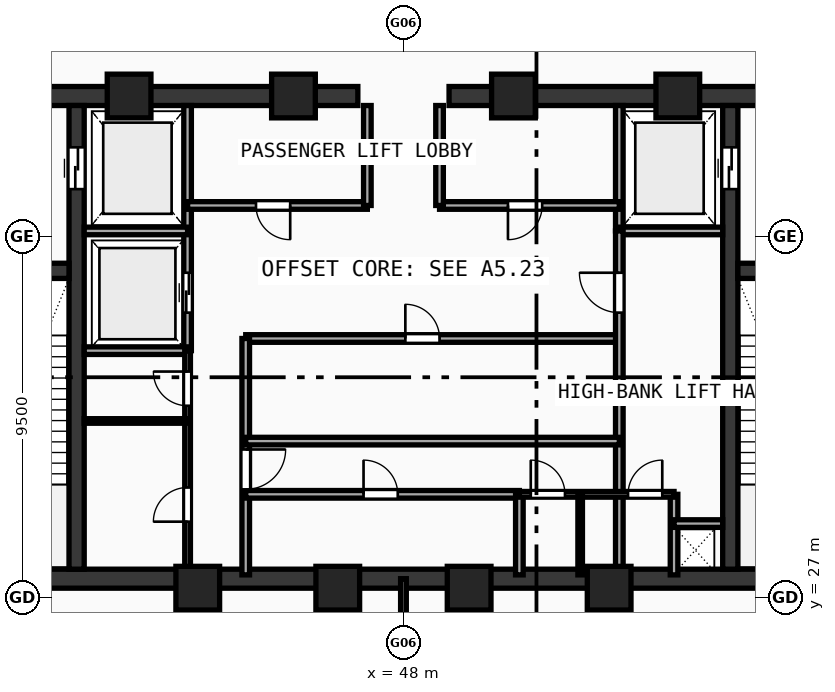
"""IFC4 building model, lengths in metres.
Left out: names, types, materials, properties, quantities, classifications, styles, units other than length and angle.
Written with IfcOpenShell. Run it as: python <this file> out.ifc"""

import sys

from ifc_helpers import new_model, si_unit, direction, frame, frame_2d, origin, origin_with_axes, origin_2d, place, context, subcontext, project, spatial, rectangle, hollow_rectangle, extrude, source, transform, mapped, element, fill, save


model = new_model("IFC4")
c1 = context("Model", 3, precision=1e-05, world=origin(), true_north=direction((0.0, 1.0)))
c2 = subcontext(c1, "Body", "Model", "MODEL_VIEW")
j1 = project(units=[si_unit("LENGTHUNIT", "METRE"), si_unit("PLANEANGLEUNIT", "RADIAN")], contexts=[c1])
p1 = place(None, origin())
s1 = spatial("IfcSite", under=j1, at=p1, CompositionType="ELEMENT")
p2 = place(p1, origin())
s2 = spatial("IfcBuilding", under=s1, at=p2, CompositionType="ELEMENT")
p3 = place(p2, frame((0.0, 0.0, 376.76)))
s3 = spatial("IfcBuildingStorey", under=s2, at=p3, CompositionType="ELEMENT", Elevation=376.76)
p4 = place(p3, frame((35.55, 27.5, 0.0), z_axis=(0.0, 0.0, 1.0), x_axis=(1.0, 0.0, 0.0)))
e1 = element("IfcWall", 1, at=p4, inside=s3, PredefinedType="SHEAR", context=c2, shape_type="SweptSolid", body=[
    extrude(rectangle(XDim=24.9, YDim=0.5, at=frame_2d((12.45, 0.0))), origin(), (0.0, 0.0, 1.0), 4.72),
])
p5 = place(p3, frame((35.55, 40.2, 0.0), z_axis=(0.0, 0.0, 1.0), x_axis=(1.0, 0.0, 0.0)))
e2 = element("IfcWall", 2, at=p5, inside=s3, PredefinedType="SHEAR", context=c2, shape_type="SweptSolid", body=[
    extrude(rectangle(XDim=11.25, YDim=0.5, at=frame_2d((5.625, 0.0))), origin(), (0.0, 0.0, 1.0), 4.72),
])
p6 = place(p5, frame((1.6, 0.0, 0.0)))
e3 = element("IfcOpeningElement", 3, at=p6, cuts=e2, PredefinedType="OPENING", context=c2, shape_type="SweptSolid", body=[
    extrude(rectangle(XDim=1.05, YDim=2.1, at=frame_2d((0.525, 1.05))), frame((0.0, 0.26, 0.0), z_axis=(0.0, -1.0, 0.0), x_axis=(1.0, 0.0, 0.0)), (0.0, 0.0, 1.0), 0.52),
])
p7 = place(p3, frame((49.2, 40.2, 0.0), z_axis=(0.0, 0.0, 1.0), x_axis=(1.0, 0.0, 0.0)))
e4 = element("IfcWall", 4, at=p7, inside=s3, PredefinedType="SHEAR", context=c2, shape_type="SweptSolid", body=[
    extrude(rectangle(XDim=11.25, YDim=0.5, at=frame_2d((5.625, 0.0))), origin(), (0.0, 0.0, 1.0), 4.72),
])
p8 = place(p7, frame((8.6, 0.0, 0.0)))
e5 = element("IfcOpeningElement", 5, at=p8, cuts=e4, PredefinedType="OPENING", context=c2, shape_type="SweptSolid", body=[
    extrude(rectangle(XDim=1.05, YDim=2.1, at=frame_2d((0.525, 1.05))), frame((0.0, 0.26, 0.0), z_axis=(0.0, -1.0, 0.0), x_axis=(1.0, 0.0, 0.0)), (0.0, 0.0, 1.0), 0.52),
])
p9 = place(p3, frame((39.4, 27.75, 0.0), z_axis=(0.0, 0.0, 1.0), x_axis=(0.0, 1.0, 0.0)))
e6 = element("IfcWall", 6, at=p9, inside=s3, PredefinedType="SHEAR", context=c2, shape_type="SweptSolid", body=[
    extrude(rectangle(XDim=12.2, YDim=0.4, at=frame_2d((6.1, 0.0))), origin(), (0.0, 0.0, 1.0), 4.72),
])
p10 = place(p9, frame((10.0, 0.0, 0.0)))
e7 = element("IfcOpeningElement", 7, at=p10, cuts=e6, PredefinedType="OPENING", context=c2, shape_type="SweptSolid", body=[
    extrude(rectangle(XDim=1.1, YDim=2.1, at=frame_2d((0.55, 1.05))), frame((0.0, 0.21, 0.0), z_axis=(0.0, -1.0, 0.0), x_axis=(1.0, 0.0, 0.0)), (0.0, 0.0, 1.0), 0.42),
])
p11 = place(p3, frame((56.6, 27.75, 0.0), z_axis=(0.0, 0.0, 1.0), x_axis=(0.0, 1.0, 0.0)))
e8 = element("IfcWall", 8, at=p11, inside=s3, PredefinedType="SHEAR", context=c2, shape_type="SweptSolid", body=[
    extrude(rectangle(XDim=12.2, YDim=0.4, at=frame_2d((6.1, 0.0))), origin(), (0.0, 0.0, 1.0), 4.72),
])
p12 = place(p11, frame((10.0, 0.0, 0.0)))
e9 = element("IfcOpeningElement", 9, at=p12, cuts=e8, PredefinedType="OPENING", context=c2, shape_type="SweptSolid", body=[
    extrude(rectangle(XDim=1.1, YDim=2.1, at=frame_2d((0.55, 1.05))), frame((0.0, 0.21, 0.0), z_axis=(0.0, -1.0, 0.0), x_axis=(1.0, 0.0, 0.0)), (0.0, 0.0, 1.0), 0.42),
])
p13 = place(p3, frame((36.05, 35.6, 0.0), z_axis=(0.0, 0.0, 1.0), x_axis=(1.0, 0.0, 0.0)))
e10 = element("IfcWall", 10, at=p13, inside=s3, PredefinedType="SHEAR", context=c2, shape_type="SweptSolid", body=[
    extrude(rectangle(XDim=3.15, YDim=0.4, at=frame_2d((1.575, 0.0))), origin(), (0.0, 0.0, 1.0), 4.72),
])
p14 = place(p13, frame((1.07, 0.0, 0.0)))
e11 = element("IfcOpeningElement", 11, at=p14, cuts=e10, PredefinedType="OPENING", context=c2, shape_type="SweptSolid", body=[
    extrude(rectangle(XDim=1.05, YDim=2.1, at=frame_2d((0.525, 1.05))), frame((0.0, 0.21, 0.0), z_axis=(0.0, -1.0, 0.0), x_axis=(1.0, 0.0, 0.0)), (0.0, 0.0, 1.0), 0.42),
])
p15 = place(p3, frame((56.8, 35.6, 0.0), z_axis=(0.0, 0.0, 1.0), x_axis=(1.0, 0.0, 0.0)))
e12 = element("IfcWall", 12, at=p15, inside=s3, PredefinedType="SHEAR", context=c2, shape_type="SweptSolid", body=[
    extrude(rectangle(XDim=3.15, YDim=0.4, at=frame_2d((1.575, 0.0))), origin(), (0.0, 0.0, 1.0), 4.72),
])
p16 = place(p15, frame((1.02, 0.0, 0.0)))
e13 = element("IfcOpeningElement", 13, at=p16, cuts=e12, PredefinedType="OPENING", context=c2, shape_type="SweptSolid", body=[
    extrude(rectangle(XDim=1.05, YDim=2.1, at=frame_2d((0.525, 1.05))), frame((0.0, 0.21, 0.0), z_axis=(0.0, -1.0, 0.0), x_axis=(1.0, 0.0, 0.0)), (0.0, 0.0, 1.0), 0.42),
])
m1 = source(origin(), c2, "Body", "SweptSolid", [
    extrude(hollow_rectangle(XDim=1.15, YDim=1.15, WallThickness=0.048, at=origin_2d()), origin(), (0.0, 0.0, 1.0), 5.0),
])
for number, where, z_axis, x_axis in (
    (14, (42.588, 27.25, -0.28), (0.0, 0.0, 1.0), (1.0, 0.0, 0.0)),
    (15, (46.272, 27.25, -0.28), (0.0, 0.0, 1.0), (1.0, 0.0, 0.0)),
    (16, (49.729, 27.25, -0.28), (0.0, 0.0, 1.0), (1.0, 0.0, 0.0)),
    (17, (53.412, 27.25, -0.28), (0.0, 0.0, 1.0), (1.0, 0.0, 0.0)),
    (18, (55.219, 40.2, -0.28), (0.0, 0.0, 1.0), (1.0, 0.0, 0.0)),
    (19, (50.894, 40.2, -0.28), (0.0, 0.0, 1.0), (1.0, 0.0, 0.0)),
    (20, (45.106, 40.2, -0.28), (0.0, 0.0, 1.0), (1.0, 0.0, 0.0)),
    (21, (40.781, 40.2, -0.28), (0.0, 0.0, 1.0), (1.0, 0.0, 0.0)),
):
    element("IfcColumn", number, at=place(p3, frame(where, z_axis=z_axis, x_axis=x_axis)), inside=s3, PredefinedType="COLUMN", context=c2, shape_type="MappedRepresentation", body=[
        mapped(m1, transform((0.0, 0.0, 0.0), scale=1.0)),
    ])
p17 = place(p3, frame((42.32, 33.5, 0.0), z_axis=(0.0, 0.0, 1.0), x_axis=(0.0, 1.0, 0.0)))
e22 = element("IfcWall", 22, at=p17, inside=s3, PredefinedType="SOLIDWALL", context=c2, shape_type="SweptSolid", body=[
    extrude(rectangle(XDim=6.45, YDim=0.2, at=frame_2d((3.225, 0.0))), origin(), (0.0, 0.0, 1.0), 4.72),
])
p18 = place(p17, frame((1.0, 0.0, 0.0)))
e23 = element("IfcOpeningElement", 23, at=p18, cuts=e22, PredefinedType="OPENING", context=c2, shape_type="SweptSolid", body=[
    extrude(rectangle(XDim=1.05, YDim=2.1, at=frame_2d((0.525, 1.05))), frame((0.0, 0.11, 0.0), z_axis=(0.0, -1.0, 0.0), x_axis=(1.0, 0.0, 0.0)), (0.0, 0.0, 1.0), 0.22),
])
for number, where, z_axis, x_axis in (
    (24, (39.6, 36.65, 0.0), (0.0, 0.0, 1.0), (1.0, 0.0, 0.0)),
    (25, (39.6, 33.5, 0.0), (0.0, 0.0, 1.0), (1.0, 0.0, 0.0)),
):
    element("IfcWall", number, at=place(p3, frame(where, z_axis=z_axis, x_axis=x_axis)), inside=s3, PredefinedType="SOLIDWALL", context=c2, shape_type="SweptSolid", body=[
        extrude(rectangle(XDim=2.72, YDim=0.2, at=frame_2d((1.36, 0.0))), origin(), (0.0, 0.0, 1.0), 4.72),
    ])
p19 = place(p3, frame((53.68, 36.65, 0.0), z_axis=(0.0, 0.0, 1.0), x_axis=(0.0, 1.0, 0.0)))
e26 = element("IfcWall", 26, at=p19, inside=s3, PredefinedType="SOLIDWALL", context=c2, shape_type="SweptSolid", body=[
    extrude(rectangle(XDim=3.3, YDim=0.2, at=frame_2d((1.65, 0.0))), origin(), (0.0, 0.0, 1.0), 4.72),
])
p20 = place(p3, frame((53.68, 36.65, 0.0), z_axis=(0.0, 0.0, 1.0), x_axis=(1.0, 0.0, 0.0)))
e27 = element("IfcWall", 27, at=p20, inside=s3, PredefinedType="SOLIDWALL", context=c2, shape_type="SweptSolid", body=[
    extrude(rectangle(XDim=2.72, YDim=0.2, at=frame_2d((1.36, 0.0))), origin(), (0.0, 0.0, 1.0), 4.72),
])
p21 = place(p3, frame((42.32, 37.32, 0.0), z_axis=(0.0, 0.0, 1.0), x_axis=(1.0, 0.0, 0.0)))
e28 = element("IfcWall", 28, at=p21, inside=s3, PredefinedType="SOLIDWALL", context=c2, shape_type="SweptSolid", body=[
    extrude(rectangle(XDim=4.73, YDim=0.2, at=frame_2d((2.365, 0.0))), origin(), (0.0, 0.0, 1.0), 4.72),
])
p22 = place(p21, frame((1.8, 0.0, 0.0)))
e29 = element("IfcOpeningElement", 29, at=p22, cuts=e28, PredefinedType="OPENING", context=c2, shape_type="SweptSolid", body=[
    extrude(rectangle(XDim=0.9, YDim=2.1, at=frame_2d((0.45, 1.05))), frame((0.0, 0.11, 0.0), z_axis=(0.0, -1.0, 0.0), x_axis=(1.0, 0.0, 0.0)), (0.0, 0.0, 1.0), 0.22),
])
p23 = place(p3, frame((48.95, 37.32, 0.0), z_axis=(0.0, 0.0, 1.0), x_axis=(1.0, 0.0, 0.0)))
e30 = element("IfcWall", 30, at=p23, inside=s3, PredefinedType="SOLIDWALL", context=c2, shape_type="SweptSolid", body=[
    extrude(rectangle(XDim=4.73, YDim=0.2, at=frame_2d((2.365, 0.0))), origin(), (0.0, 0.0, 1.0), 4.72),
])
p24 = place(p23, frame((1.8, 0.0, 0.0)))
e31 = element("IfcOpeningElement", 31, at=p24, cuts=e30, PredefinedType="OPENING", context=c2, shape_type="SweptSolid", body=[
    extrude(rectangle(XDim=0.9, YDim=2.1, at=frame_2d((0.45, 1.05))), frame((0.0, 0.11, 0.0), z_axis=(0.0, -1.0, 0.0), x_axis=(1.0, 0.0, 0.0)), (0.0, 0.0, 1.0), 0.22),
])
for number, where, z_axis, x_axis in (
    (32, (47.05, 37.32, 0.0), (0.0, 0.0, 1.0), (0.0, 1.0, 0.0)),
    (33, (48.95, 37.32, 0.0), (0.0, 0.0, 1.0), (0.0, 1.0, 0.0)),
):
    element("IfcWall", number, at=place(p3, frame(where, z_axis=z_axis, x_axis=x_axis)), inside=s3, PredefinedType="SOLIDWALL", context=c2, shape_type="SweptSolid", body=[
        extrude(rectangle(XDim=2.63, YDim=0.2, at=frame_2d((1.315, 0.0))), origin(), (0.0, 0.0, 1.0), 4.72),
    ])
p25 = place(p3, frame((43.85, 33.82, 0.0), z_axis=(0.0, 0.0, 1.0), x_axis=(1.0, 0.0, 0.0)))
e34 = element("IfcWall", 34, at=p25, inside=s3, PredefinedType="SOLIDWALL", context=c2, shape_type="SweptSolid", body=[
    extrude(rectangle(XDim=9.83, YDim=0.2, at=frame_2d((4.915, 0.0))), origin(), (0.0, 0.0, 1.0), 4.72),
])
p26 = place(p25, frame((4.2, 0.0, 0.0)))
e35 = element("IfcOpeningElement", 35, at=p26, cuts=e34, PredefinedType="OPENING", context=c2, shape_type="SweptSolid", body=[
    extrude(rectangle(XDim=0.9, YDim=2.1, at=frame_2d((0.45, 1.05))), frame((0.0, 0.11, 0.0), z_axis=(0.0, -1.0, 0.0), x_axis=(1.0, 0.0, 0.0)), (0.0, 0.0, 1.0), 0.22),
])
p27 = place(p3, frame((43.85, 27.6, 0.0), z_axis=(0.0, 0.0, 1.0), x_axis=(0.0, 1.0, 0.0)))
e36 = element("IfcWall", 36, at=p27, inside=s3, PredefinedType="SOLIDWALL", context=c2, shape_type="SweptSolid", body=[
    extrude(rectangle(XDim=6.22, YDim=0.2, at=frame_2d((3.11, 0.0))), origin(), (0.0, 0.0, 1.0), 4.72),
])
p28 = place(p27, frame((2.25, 0.0, 0.0)))
e37 = element("IfcOpeningElement", 37, at=p28, cuts=e36, PredefinedType="OPENING", context=c2, shape_type="SweptSolid", body=[
    extrude(rectangle(XDim=1.05, YDim=2.1, at=frame_2d((0.525, 1.05))), frame((0.0, 0.11, 0.0), z_axis=(0.0, -1.0, 0.0), x_axis=(1.0, 0.0, 0.0)), (0.0, 0.0, 1.0), 0.22),
])
p29 = place(p3, frame((53.68, 27.6, 0.0), z_axis=(0.0, 0.0, 1.0), x_axis=(0.0, 1.0, 0.0)))
e38 = element("IfcWall", 38, at=p29, inside=s3, PredefinedType="SOLIDWALL", context=c2, shape_type="SweptSolid", body=[
    extrude(rectangle(XDim=9.05, YDim=0.2, at=frame_2d((4.525, 0.0))), origin(), (0.0, 0.0, 1.0), 4.72),
])
p30 = place(p29, frame((6.9, 0.0, 0.0)))
e39 = element("IfcOpeningElement", 39, at=p30, cuts=e38, PredefinedType="OPENING", context=c2, shape_type="SweptSolid", body=[
    extrude(rectangle(XDim=1.05, YDim=2.1, at=frame_2d((0.525, 1.05))), frame((0.0, 0.11, 0.0), z_axis=(0.0, -1.0, 0.0), x_axis=(1.0, 0.0, 0.0)), (0.0, 0.0, 1.0), 0.22),
])
p31 = place(p3, frame((43.85, 29.72, 0.0), z_axis=(0.0, 0.0, 1.0), x_axis=(1.0, 0.0, 0.0)))
e40 = element("IfcWall", 40, at=p31, inside=s3, PredefinedType="SOLIDWALL", context=c2, shape_type="SweptSolid", body=[
    extrude(rectangle(XDim=7.2, YDim=0.2, at=frame_2d((3.6, 0.0))), origin(), (0.0, 0.0, 1.0), 4.72),
])
p32 = place(p31, frame((3.1, 0.0, 0.0)))
e41 = element("IfcOpeningElement", 41, at=p32, cuts=e40, PredefinedType="OPENING", context=c2, shape_type="SweptSolid", body=[
    extrude(rectangle(XDim=0.9, YDim=2.1, at=frame_2d((0.45, 1.05))), frame((0.0, 0.11, 0.0), z_axis=(0.0, -1.0, 0.0), x_axis=(1.0, 0.0, 0.0)), (0.0, 0.0, 1.0), 0.22),
])
p33 = place(p3, frame((51.05, 27.6, 0.0), z_axis=(0.0, 0.0, 1.0), x_axis=(0.0, 1.0, 0.0)))
e42 = element("IfcWall", 42, at=p33, inside=s3, PredefinedType="SOLIDWALL", context=c2, shape_type="SweptSolid", body=[
    extrude(rectangle(XDim=2.12, YDim=0.2, at=frame_2d((1.06, 0.0))), origin(), (0.0, 0.0, 1.0), 4.72),
])
p34 = place(p3, frame((43.85, 31.12, 0.0), z_axis=(0.0, 0.0, 1.0), x_axis=(1.0, 0.0, 0.0)))
e43 = element("IfcWall", 43, at=p34, inside=s3, PredefinedType="SOLIDWALL", context=c2, shape_type="SweptSolid", body=[
    extrude(rectangle(XDim=9.83, YDim=0.2, at=frame_2d((4.915, 0.0))), origin(), (0.0, 0.0, 1.0), 4.72),
])
p35 = place(p3, frame((55.12, 27.6, 0.0), z_axis=(0.0, 0.0, 1.0), x_axis=(0.0, 1.0, 0.0)))
e44 = element("IfcWall", 44, at=p35, inside=s3, PredefinedType="SOLIDWALL", context=c2, shape_type="SweptSolid", body=[
    extrude(rectangle(XDim=2.12, YDim=0.2, at=frame_2d((1.06, 0.0))), origin(), (0.0, 0.0, 1.0), 4.72),
])
p36 = place(p3, frame((55.12, 28.95, 0.0), z_axis=(0.0, 0.0, 1.0), x_axis=(1.0, 0.0, 0.0)))
e45 = element("IfcWall", 45, at=p36, inside=s3, PredefinedType="SOLIDWALL", context=c2, shape_type="SweptSolid", body=[
    extrude(rectangle(XDim=1.28, YDim=0.2, at=frame_2d((0.64, 0.0))), origin(), (0.0, 0.0, 1.0), 4.72),
])
p37 = place(p3, frame((42.32, 27.6, 0.0), z_axis=(0.0, 0.0, 1.0), x_axis=(0.0, 1.0, 0.0)))
e46 = element("IfcWall", 46, at=p37, inside=s3, PredefinedType="PARTITIONING", context=c2, shape_type="SweptSolid", body=[
    extrude(rectangle(XDim=5.9, YDim=0.15, at=frame_2d((2.95, 0.0))), origin(), (0.0, 0.0, 1.0), 4.72),
])
p38 = place(p37, frame((1.4, 0.0, 0.0)))
e47 = element("IfcOpeningElement", 47, at=p38, cuts=e46, PredefinedType="OPENING", context=c2, shape_type="SweptSolid", body=[
    extrude(rectangle(XDim=0.9, YDim=2.1, at=frame_2d((0.45, 1.05))), frame((0.0, 0.085, 0.0), z_axis=(0.0, -1.0, 0.0), x_axis=(1.0, 0.0, 0.0)), (0.0, 0.0, 1.0), 0.17),
])
p39 = place(p37, frame((4.45, 0.0, 0.0)))
e48 = element("IfcOpeningElement", 48, at=p39, cuts=e46, PredefinedType="OPENING", context=c2, shape_type="SweptSolid", body=[
    extrude(rectangle(XDim=0.9, YDim=2.1, at=frame_2d((0.45, 1.05))), frame((0.0, 0.085, 0.0), z_axis=(0.0, -1.0, 0.0), x_axis=(1.0, 0.0, 0.0)), (0.0, 0.0, 1.0), 0.17),
])
p40 = place(p3, frame((51.05, 29.72, 0.0), z_axis=(0.0, 0.0, 1.0), x_axis=(1.0, 0.0, 0.0)))
e49 = element("IfcWall", 49, at=p40, inside=s3, PredefinedType="PARTITIONING", context=c2, shape_type="SweptSolid", body=[
    extrude(rectangle(XDim=4.07, YDim=0.15, at=frame_2d((2.035, 0.0))), origin(), (0.0, 0.0, 1.0), 4.72),
])
p41 = place(p40, frame((0.3, 0.0, 0.0)))
e50 = element("IfcOpeningElement", 50, at=p41, cuts=e49, PredefinedType="OPENING", context=c2, shape_type="SweptSolid", body=[
    extrude(rectangle(XDim=0.9, YDim=2.1, at=frame_2d((0.45, 1.05))), frame((0.0, 0.085, 0.0), z_axis=(0.0, -1.0, 0.0), x_axis=(1.0, 0.0, 0.0)), (0.0, 0.0, 1.0), 0.17),
])
p42 = place(p40, frame((2.86, 0.0, 0.0)))
e51 = element("IfcOpeningElement", 51, at=p42, cuts=e49, PredefinedType="OPENING", context=c2, shape_type="SweptSolid", body=[
    extrude(rectangle(XDim=0.9, YDim=2.1, at=frame_2d((0.45, 1.05))), frame((0.0, 0.085, 0.0), z_axis=(0.0, -1.0, 0.0), x_axis=(1.0, 0.0, 0.0)), (0.0, 0.0, 1.0), 0.17),
])
p43 = place(p3, frame((39.6, 31.65, 0.0), z_axis=(0.0, 0.0, 1.0), x_axis=(1.0, 0.0, 0.0)))
e52 = element("IfcWall", 52, at=p43, inside=s3, PredefinedType="PARTITIONING", context=c2, shape_type="SweptSolid", body=[
    extrude(rectangle(XDim=2.72, YDim=0.12, at=frame_2d((1.36, 0.0))), origin(), (0.0, 0.0, 1.0), 4.72),
])
p44 = place(p3, frame((52.65, 27.6, 0.0), z_axis=(0.0, 0.0, 1.0), x_axis=(0.0, 1.0, 0.0)))
e53 = element("IfcWall", 53, at=p44, inside=s3, PredefinedType="PARTITIONING", context=c2, shape_type="SweptSolid", body=[
    extrude(rectangle(XDim=2.12, YDim=0.12, at=frame_2d((1.06, 0.0))), origin(), (0.0, 0.0, 1.0), 4.72),
])
p45 = place(p3, frame((48.0, 23.314, 0.0), z_axis=(0.0, 0.0, 1.0), x_axis=(0.0, 1.0, 0.0)))
e54 = element("IfcWall", 54, at=p45, inside=s3, PredefinedType="PARTITIONING", context=c2, shape_type="SweptSolid", body=[
    extrude(rectangle(XDim=4.186, YDim=0.15, at=frame_2d((2.093, 0.0))), origin(), (0.0, 0.0, 1.0), 4.12),
])
m2 = source(origin(), c2, "Body", "SweptSolid", [
    extrude(rectangle(XDim=1.1, YDim=2.1, at=frame_2d((0.55, 1.05))), frame((0.0, 0.025, 0.0), z_axis=(0.0, -1.0, 0.0), x_axis=(1.0, 0.0, 0.0)), (0.0, 0.0, 1.0), 0.05),
])
p46 = place(p10, frame((1.1, 0.0, 0.0), z_axis=(0.0, 0.0, 1.0), x_axis=(-1.0, 0.0, 0.0)))
e55 = element("IfcDoor", 55, at=p46, inside=s3, OperationType="DOUBLE_DOOR_SLIDING", PredefinedType="DOOR", context=c2, shape_type="MappedRepresentation", body=[
    mapped(m2, transform((0.0, 0.0, 0.0), scale=1.0)),
])
fill(e7, e55)
p47 = place(p12, origin_with_axes())
e56 = element("IfcDoor", 56, at=p47, inside=s3, OperationType="DOUBLE_DOOR_SLIDING", PredefinedType="DOOR", context=c2, shape_type="MappedRepresentation", body=[
    mapped(m2, transform((0.0, 0.0, 0.0), scale=1.0)),
])
fill(e9, e56)
m3 = source(origin(), c2, "Body", "SweptSolid", [
    extrude(rectangle(XDim=1.05, YDim=2.1, at=frame_2d((0.525, 1.05))), frame((0.0, 0.025, 0.0), z_axis=(0.0, -1.0, 0.0), x_axis=(1.0, 0.0, 0.0)), (0.0, 0.0, 1.0), 0.05),
])
p48 = place(p18, origin_with_axes())
e57 = element("IfcDoor", 57, at=p48, inside=s3, OperationType="DOUBLE_DOOR_SLIDING", PredefinedType="DOOR", context=c2, shape_type="MappedRepresentation", body=[
    mapped(m3, transform((0.0, 0.0, 0.0), scale=1.0)),
])
fill(e23, e57)
m4 = source(origin(), c2, "Body", "SweptSolid", [
    extrude(rectangle(XDim=0.9, YDim=2.1, at=frame_2d((0.45, 1.05))), frame((0.0, 0.025, 0.0), z_axis=(0.0, -1.0, 0.0), x_axis=(1.0, 0.0, 0.0)), (0.0, 0.0, 1.0), 0.05),
])
p49 = place(p22, frame((0.9, 0.0, 0.0), z_axis=(0.0, 0.0, 1.0), x_axis=(-1.0, 0.0, 0.0)))
e58 = element("IfcDoor", 58, at=p49, inside=s3, OperationType="SINGLE_SWING_LEFT", PredefinedType="DOOR", context=c2, shape_type="MappedRepresentation", body=[
    mapped(m4, transform((0.0, 0.0, 0.0), scale=1.0)),
])
fill(e29, e58)
p50 = place(p24, frame((0.9, 0.0, 0.0), z_axis=(0.0, 0.0, 1.0), x_axis=(-1.0, 0.0, 0.0)))
e59 = element("IfcDoor", 59, at=p50, inside=s3, OperationType="SINGLE_SWING_RIGHT", PredefinedType="DOOR", context=c2, shape_type="MappedRepresentation", body=[
    mapped(m4, transform((0.0, 0.0, 0.0), scale=1.0)),
])
fill(e31, e59)
p51 = place(p26, origin_with_axes())
e60 = element("IfcDoor", 60, at=p51, inside=s3, OperationType="SINGLE_SWING_LEFT", PredefinedType="DOOR", context=c2, shape_type="MappedRepresentation", body=[
    mapped(m4, transform((0.0, 0.0, 0.0), scale=1.0)),
])
fill(e35, e60)
p52 = place(p28, frame((1.05, 0.0, 0.0), z_axis=(0.0, 0.0, 1.0), x_axis=(-1.0, 0.0, 0.0)))
e61 = element("IfcDoor", 61, at=p52, inside=s3, OperationType="SINGLE_SWING_LEFT", PredefinedType="DOOR", context=c2, shape_type="MappedRepresentation", body=[
    mapped(m3, transform((0.0, 0.0, 0.0), scale=1.0)),
])
fill(e37, e61)
p53 = place(p30, origin_with_axes())
e62 = element("IfcDoor", 62, at=p53, inside=s3, OperationType="SINGLE_SWING_RIGHT", PredefinedType="DOOR", context=c2, shape_type="MappedRepresentation", body=[
    mapped(m3, transform((0.0, 0.0, 0.0), scale=1.0)),
])
fill(e39, e62)
p54 = place(p32, origin_with_axes())
e63 = element("IfcDoor", 63, at=p54, inside=s3, OperationType="SINGLE_SWING_LEFT", PredefinedType="DOOR", context=c2, shape_type="MappedRepresentation", body=[
    mapped(m4, transform((0.0, 0.0, 0.0), scale=1.0)),
])
fill(e41, e63)
p55 = place(p38, origin_with_axes())
e64 = element("IfcDoor", 64, at=p55, inside=s3, OperationType="SINGLE_SWING_LEFT", PredefinedType="DOOR", context=c2, shape_type="MappedRepresentation", body=[
    mapped(m4, transform((0.0, 0.0, 0.0), scale=1.0)),
])
fill(e47, e64)
p56 = place(p39, origin_with_axes())
e65 = element("IfcDoor", 65, at=p56, inside=s3, OperationType="SINGLE_SWING_RIGHT", PredefinedType="DOOR", context=c2, shape_type="MappedRepresentation", body=[
    mapped(m4, transform((0.0, 0.0, 0.0), scale=1.0)),
])
fill(e48, e65)
p57 = place(p41, origin_with_axes())
e66 = element("IfcDoor", 66, at=p57, inside=s3, OperationType="SINGLE_SWING_LEFT", PredefinedType="DOOR", context=c2, shape_type="MappedRepresentation", body=[
    mapped(m4, transform((0.0, 0.0, 0.0), scale=1.0)),
])
fill(e50, e66)
p58 = place(p42, origin_with_axes())
e67 = element("IfcDoor", 67, at=p58, inside=s3, OperationType="SINGLE_SWING_RIGHT", PredefinedType="DOOR", context=c2, shape_type="MappedRepresentation", body=[
    mapped(m4, transform((0.0, 0.0, 0.0), scale=1.0)),
])
fill(e51, e67)
save(model, sys.argv[1])
